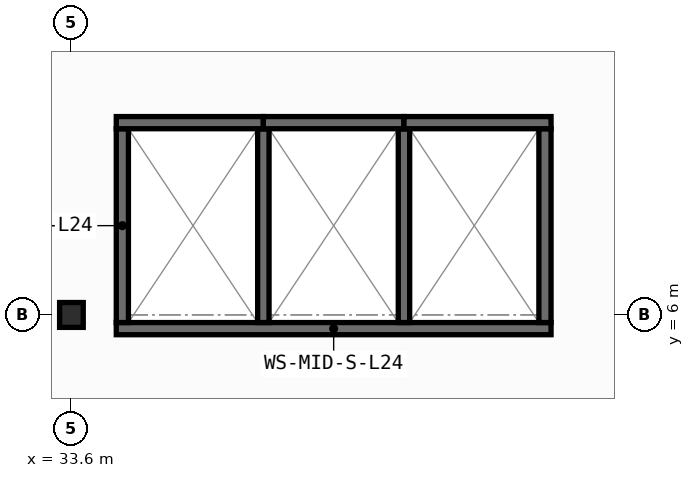
"""IFC4 building model, lengths in metres.
Left out: names, types, materials, properties, quantities, classifications, styles, units other than length and angle.
Written with IfcOpenShell. Run it as: python <this file> out.ifc"""

import sys

from ifc_helpers import new_model, si_unit, direction, frame, frame_2d, origin, origin_2d, place, context, subcontext, project, spatial, rectangle, i_section, extrude, element, save


model = new_model("IFC4")
c1 = context("Model", 3, precision=1e-05, world=origin(), true_north=direction((0.0, 1.0)))
c2 = subcontext(c1, "Body", "Model", "MODEL_VIEW")
j1 = project(units=[si_unit("LENGTHUNIT", "METRE"), si_unit("PLANEANGLEUNIT", "RADIAN")], contexts=[c1])
p1 = place(None, origin())
s1 = spatial("IfcSite", under=j1, at=p1, CompositionType="ELEMENT")
p2 = place(p1, origin())
s2 = spatial("IfcBuilding", under=s1, at=p2, CompositionType="ELEMENT")
p3 = place(p2, frame((0.0, 0.0, 97.55)))
s3 = spatial("IfcBuildingStorey", under=s2, at=p3, CompositionType="ELEMENT", Elevation=97.55)
p4 = place(p3, frame((33.6, 6.0, 0.0), z_axis=(0.0, 0.0, 1.0), x_axis=(1.0, 0.0, 0.0)))
e1 = element("IfcColumn", 1, at=p4, inside=s3, PredefinedType="COLUMN", context=c2, shape_type="SweptSolid", body=[
    extrude(i_section(OverallWidth=0.311, OverallDepth=0.327, WebThickness=0.016, FlangeThickness=0.025, FilletRadius=0.017, at=origin_2d()), origin(), (0.0, 0.0, 1.0), 5.8),
])
p5 = place(p3, frame((34.19, 5.82, 0.0), z_axis=(0.0, 0.0, 1.0), x_axis=(1.0, 0.0, 0.0)))
e2 = element("IfcWall", 2, at=p5, inside=s3, PredefinedType="SHEAR", context=c2, shape_type="SweptSolid", body=[
    extrude(rectangle(XDim=5.72, YDim=0.16, at=frame_2d((2.86, 0.0))), origin(), (0.0, 0.0, 1.0), 5.56),
])
for number, where, z_axis, x_axis in (
    (3, (34.27, 5.9, 0.0), (0.0, 0.0, 1.0), (0.0, 1.0, 0.0)),
    (4, (39.83, 5.9, 0.0), (0.0, 0.0, 1.0), (0.0, 1.0, 0.0)),
):
    element("IfcWall", number, at=place(p3, frame(where, z_axis=z_axis, x_axis=x_axis)), inside=s3, PredefinedType="SHEAR", context=c2, shape_type="SweptSolid", body=[
        extrude(rectangle(XDim=2.55, YDim=0.16, at=frame_2d((1.275, 0.0))), origin(), (0.0, 0.0, 1.0), 5.56),
    ])
for number, where, z_axis, x_axis in (
    (5, (36.125, 5.9, 0.0), (0.0, 0.0, 1.0), (0.0, 1.0, 0.0)),
    (6, (37.975, 5.9, 0.0), (0.0, 0.0, 1.0), (0.0, 1.0, 0.0)),
):
    element("IfcWall", number, at=place(p3, frame(where, z_axis=z_axis, x_axis=x_axis)), inside=s3, PredefinedType="SHEAR", context=c2, shape_type="SweptSolid", body=[
        extrude(rectangle(XDim=2.55, YDim=0.15, at=frame_2d((1.275, 0.0))), origin(), (0.0, 0.0, 1.0), 5.56),
    ])
p6 = place(p3, frame((34.19, 8.53, 0.0), z_axis=(0.0, 0.0, 1.0), x_axis=(1.0, 0.0, 0.0)))
e7 = element("IfcWall", 7, at=p6, inside=s3, PredefinedType="SHEAR", context=c2, shape_type="SweptSolid", body=[
    extrude(rectangle(XDim=1.935, YDim=0.16, at=frame_2d((0.968, 0.0))), origin(), (0.0, 0.0, 1.0), 5.56),
])
p7 = place(p3, frame((36.125, 8.53, 0.0), z_axis=(0.0, 0.0, 1.0), x_axis=(1.0, 0.0, 0.0)))
e8 = element("IfcWall", 8, at=p7, inside=s3, PredefinedType="SHEAR", context=c2, shape_type="SweptSolid", body=[
    extrude(rectangle(XDim=1.85, YDim=0.16, at=frame_2d((0.925, 0.0))), origin(), (0.0, 0.0, 1.0), 5.56),
])
p8 = place(p3, frame((37.975, 8.53, 0.0), z_axis=(0.0, 0.0, 1.0), x_axis=(1.0, 0.0, 0.0)))
e9 = element("IfcWall", 9, at=p8, inside=s3, PredefinedType="SHEAR", context=c2, shape_type="SweptSolid", body=[
    extrude(rectangle(XDim=1.935, YDim=0.16, at=frame_2d((0.967, 0.0))), origin(), (0.0, 0.0, 1.0), 5.56),
])
save(model, sys.argv[1])
